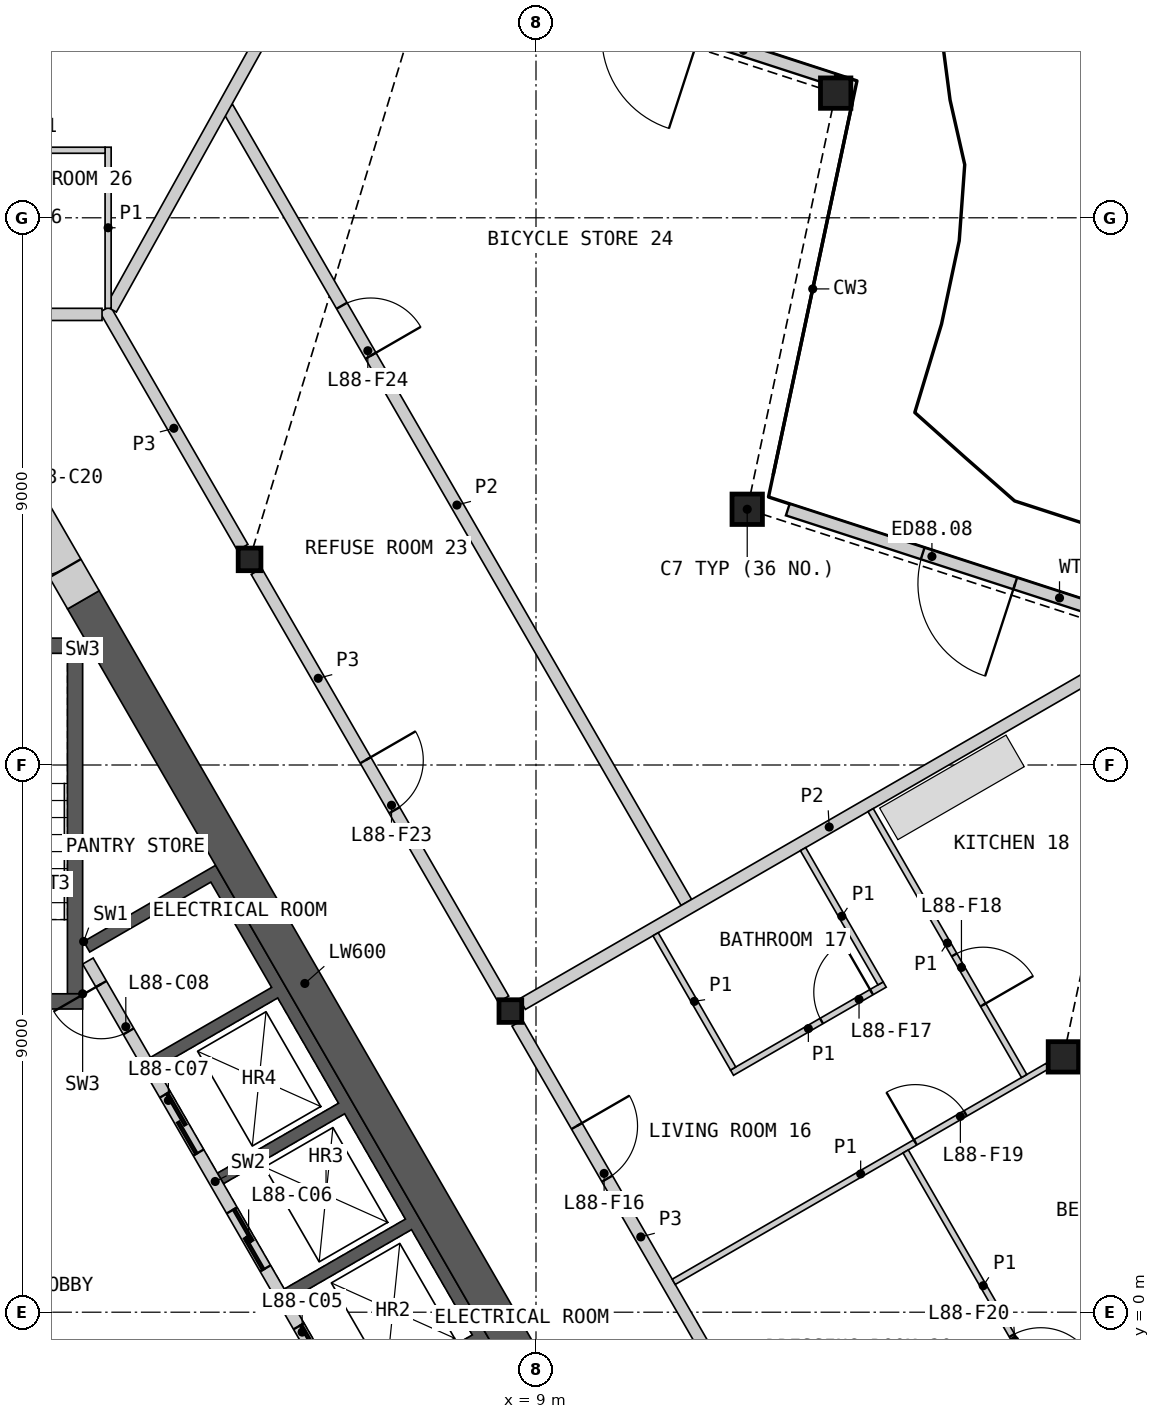
"""IFC4 building model, lengths in metres.
Left out: names, types, materials, properties, quantities, classifications, styles, units other than length and angle.
Written with IfcOpenShell. Run it as: python <this file> out.ifc"""

import sys

from ifc_helpers import new_model, si_unit, direction, frame, frame_2d, origin, origin_2d, place, context, subcontext, project, spatial, polyline, rectangle, hollow_rectangle, i_section, outline, extrude, element, fill, save


model = new_model("IFC4")
c1 = context("Model", 3, precision=1e-05, world=origin(), true_north=direction((0.0, 1.0)))
c2 = subcontext(c1, "Body", "Model", "MODEL_VIEW")
j1 = project(units=[si_unit("LENGTHUNIT", "METRE"), si_unit("PLANEANGLEUNIT", "RADIAN")], contexts=[c1])
p1 = place(None, origin())
s1 = spatial("IfcSite", under=j1, at=p1, CompositionType="ELEMENT")
p2 = place(p1, origin())
s2 = spatial("IfcBuilding", under=s1, at=p2, CompositionType="ELEMENT")
p3 = place(p2, frame((0.0, 0.0, 388.2)))
s3 = spatial("IfcBuildingStorey", under=s2, at=p3, CompositionType="ELEMENT", Elevation=388.2)
for number, where, z_axis, x_axis in (
    (1, (17.674, 4.199, 0.0), (0.0, 0.0, 1.0), (1.0, 0.0, 0.0)),
    (2, (12.474, 13.206, 0.0), (0.0, 0.0, 1.0), (1.0, 0.0, 0.0)),
    (3, (13.929, 20.051, 0.0), (0.0, 0.0, 1.0), (1.0, 0.0, 0.0)),
):
    element("IfcColumn", number, at=place(p3, frame(where, z_axis=z_axis, x_axis=x_axis)), inside=s3, PredefinedType="COLUMN", context=c2, shape_type="SweptSolid", body=[
        extrude(hollow_rectangle(XDim=0.5, YDim=0.5, WallThickness=0.03, at=origin_2d()), origin(), (0.0, 0.0, 1.0), 3.4),
    ])
for number, where, z_axis, x_axis in (
    (4, (8.578, 4.953, 0.0), (0.0, 0.0, 1.0), (1.0, 0.0, 0.0)),
    (5, (4.289, 12.382, 0.0), (0.0, 0.0, 1.0), (1.0, 0.0, 0.0)),
):
    element("IfcColumn", number, at=place(p3, frame(where, z_axis=z_axis, x_axis=x_axis)), inside=s3, PredefinedType="COLUMN", context=c2, shape_type="SweptSolid", body=[
        extrude(i_section(OverallWidth=0.374, OverallDepth=0.372, WebThickness=0.016, FlangeThickness=0.026, at=origin_2d()), origin(), (0.0, 0.0, 1.0), 3.4),
    ])
p4 = place(p3, frame((19.099, 11.264, 0.0), z_axis=(0.0, 0.0, 1.0), x_axis=(-0.951056402988, 0.3090173431, 0.0)))
e6 = element("IfcWall", 6, at=p4, inside=s3, PredefinedType="SOLIDWALL", context=c2, shape_type="SweptSolid", body=[
    extrude(rectangle(XDim=6.265, YDim=0.2, at=frame_2d((3.133, 0.0))), origin(), (0.0, 0.0, 1.0), 2.634),
])
p5 = place(p4, frame((2.333, 0.0, 0.0)))
e7 = element("IfcOpeningElement", 7, at=p5, cuts=e6, PredefinedType="OPENING", context=c2, shape_type="SweptSolid", body=[
    extrude(rectangle(XDim=1.6, YDim=2.25, at=frame_2d((0.8, 1.125))), frame((0.0, 0.11, 0.0), z_axis=(0.0, -1.0, 0.0), x_axis=(1.0, 0.0, 0.0)), (0.0, 0.0, 1.0), 0.22),
])
p6 = place(p3, frame((13.899, 20.271, 0.0), z_axis=(0.0, 0.0, 1.0), x_axis=(-0.951056402988, 0.3090173431, 0.0)))
e8 = element("IfcWall", 8, at=p6, inside=s3, PredefinedType="SOLIDWALL", context=c2, shape_type="SweptSolid", body=[
    extrude(rectangle(XDim=6.265, YDim=0.2, at=frame_2d((3.133, 0.0))), origin(), (0.0, 0.0, 1.0), 2.634),
])
p7 = place(p6, frame((2.333, 0.0, 0.0)))
e9 = element("IfcOpeningElement", 9, at=p7, cuts=e8, PredefinedType="OPENING", context=c2, shape_type="SweptSolid", body=[
    extrude(rectangle(XDim=1.6, YDim=2.25, at=frame_2d((0.8, 1.125))), frame((0.0, 0.11, 0.0), z_axis=(0.0, -1.0, 0.0), x_axis=(1.0, 0.0, 0.0)), (0.0, 0.0, 1.0), 0.22),
])
p8 = place(p3, origin())
e10 = element("IfcWall", 10, at=p8, inside=s3, PredefinedType="SHEAR", context=c2, shape_type="SweptSolid", body=[
    extrude(outline(polyline([(1.561, 6.097), (3.731, 7.35), (8.231, -0.444), (6.061, -1.697), (5.96, -1.524), (7.952, -0.374), (6.952, 1.358), (4.96, 0.208), (4.861, 0.381), (6.852, 1.531), (5.852, 3.263), (3.861, 2.113), (3.76, 2.287), (5.752, 3.437), (4.752, 5.169), (2.76, 4.019), (2.66, 4.192), (4.652, 5.342), (3.652, 7.074), (1.66, 5.924), (1.561, 6.097)])), origin(), (0.0, 0.0, 1.0), 3.1),
])
p9 = place(p3, frame((5.817, -1.476, 0.0), z_axis=(0.0, 0.0, 1.0), x_axis=(-0.500002616675, 0.866023893041, 0.0)))
e11 = element("IfcWall", 11, at=p9, inside=s3, PredefinedType="SOLIDWALL", context=c2, shape_type="SweptSolid", body=[
    extrude(rectangle(XDim=8.373, YDim=0.2, at=frame_2d((4.187, 0.0))), origin(), (0.0, 0.0, 1.0), 3.1),
])
p10 = place(p9, frame((0.337, 0.0, 0.0)))
e12 = element("IfcOpeningElement", 12, at=p10, cuts=e11, PredefinedType="OPENING", context=c2, shape_type="SweptSolid", body=[
    extrude(rectangle(XDim=1.1, YDim=2.1, at=frame_2d((0.55, 1.05))), frame((0.0, 0.11, 0.0), z_axis=(0.0, -1.0, 0.0), x_axis=(1.0, 0.0, 0.0)), (0.0, 0.0, 1.0), 0.22),
])
p11 = place(p9, frame((2.537, 0.0, 0.0)))
e13 = element("IfcOpeningElement", 13, at=p11, cuts=e11, PredefinedType="OPENING", context=c2, shape_type="SweptSolid", body=[
    extrude(rectangle(XDim=1.1, YDim=2.1, at=frame_2d((0.55, 1.05))), frame((0.0, 0.11, 0.0), z_axis=(0.0, -1.0, 0.0), x_axis=(1.0, 0.0, 0.0)), (0.0, 0.0, 1.0), 0.22),
])
p12 = place(p9, frame((4.737, 0.0, 0.0)))
e14 = element("IfcOpeningElement", 14, at=p12, cuts=e11, PredefinedType="OPENING", context=c2, shape_type="SweptSolid", body=[
    extrude(rectangle(XDim=1.1, YDim=2.1, at=frame_2d((0.55, 1.05))), frame((0.0, 0.11, 0.0), z_axis=(0.0, -1.0, 0.0), x_axis=(1.0, 0.0, 0.0)), (0.0, 0.0, 1.0), 0.22),
])
p13 = place(p9, frame((7.037, 0.0, 0.0)))
e15 = element("IfcOpeningElement", 15, at=p13, cuts=e11, PredefinedType="OPENING", context=c2, shape_type="SweptSolid", body=[
    extrude(rectangle(XDim=0.9, YDim=2.1, at=frame_2d((0.45, 1.05))), frame((0.0, 0.11, 0.0), z_axis=(0.0, -1.0, 0.0), x_axis=(1.0, 0.0, 0.0)), (0.0, 0.0, 1.0), 0.22),
])
p14 = place(p3, origin())
e16 = element("IfcWall", 16, at=p14, inside=s3, PredefinedType="SHEAR", context=c2, shape_type="SweptSolid", body=[
    extrude(outline(polyline([(1.544, 5.237), (1.544, 11.087), (1.294, 10.837), (1.294, 5.237), (1.544, 5.237)])), origin(), (0.0, 0.0, 1.0), 3.1),
])
p15 = place(p3, origin())
e17 = element("IfcWall", 17, at=p15, inside=s3, PredefinedType="SHEAR", context=c2, shape_type="SweptSolid", body=[
    extrude(outline(polyline([(1.544, 11.087), (-1.544, 11.087), (-1.294, 10.837), (1.294, 10.837), (1.544, 11.087)])), origin(), (0.0, 0.0, 1.0), 3.1),
])
p16 = place(p3, frame((1.544, 5.112, 0.0), z_axis=(0.0, 0.0, 1.0), x_axis=(-1.0, 0.0, 0.0)))
e18 = element("IfcWall", 18, at=p16, inside=s3, PredefinedType="SHEAR", context=c2, shape_type="SweptSolid", body=[
    extrude(rectangle(XDim=3.088, YDim=0.25, at=frame_2d((1.544, 0.0))), origin(), (0.0, 0.0, 1.0), 3.1),
])
p17 = place(p16, frame((0.994, 0.0, 0.0)))
e19 = element("IfcOpeningElement", 19, at=p17, cuts=e18, PredefinedType="OPENING", context=c2, shape_type="SweptSolid", body=[
    extrude(rectangle(XDim=1.1, YDim=2.1, at=frame_2d((0.55, 1.05))), frame((0.0, 0.135, 0.0), z_axis=(0.0, -1.0, 0.0), x_axis=(1.0, 0.0, 0.0)), (0.0, 0.0, 1.0), 0.27),
])
p18 = place(p3, frame((8.841, -0.902, 0.0), z_axis=(0.0, 0.0, 1.0), x_axis=(-0.499995618375, 0.866027933502, 0.0)))
e20 = element("IfcWall", 20, at=p18, inside=s3, PredefinedType="SHEAR", context=c2, shape_type="SweptSolid", body=[
    extrude(rectangle(XDim=14.571, YDim=0.6, at=frame_2d((7.285, 0.0))), origin(), (0.0, 0.0, 1.0), 3.1),
])
p19 = place(p3, frame((1.556, 11.716, 0.0), z_axis=(0.0, 0.0, 1.0), x_axis=(-0.500018667571, 0.866014625789, 0.0)))
e21 = element("IfcWall", 21, at=p19, inside=s3, PredefinedType="SHEAR", context=c2, shape_type="SweptSolid", body=[
    extrude(rectangle(XDim=2.592, YDim=0.6, at=frame_2d((1.296, 0.0))), origin(), (0.0, 0.0, 1.0), 3.1),
])
p20 = place(p19, frame((0.6, 0.0, 0.0)))
e22 = element("IfcOpeningElement", 22, at=p20, cuts=e21, PredefinedType="OPENING", context=c2, shape_type="SweptSolid", body=[
    extrude(rectangle(XDim=1.0, YDim=2.1, at=frame_2d((0.5, 1.05))), frame((0.0, 0.31, 0.0), z_axis=(0.0, -1.0, 0.0), x_axis=(1.0, 0.0, 0.0)), (0.0, 0.0, 1.0), 0.62),
])
p21 = place(p3, frame((4.403, 12.185, 0.0), z_axis=(0.0, 0.0, 1.0), x_axis=(0.499992155518, -0.866029932751, 0.0)))
e23 = element("IfcWall", 23, at=p21, inside=s3, PredefinedType="PARTITIONING", context=c2, shape_type="SweptSolid", body=[
    extrude(rectangle(XDim=8.123, YDim=0.2, at=frame_2d((4.062, 0.0))), origin(), (0.0, 0.0, 1.0), 3.1),
])
p22 = place(p21, frame((3.587, 0.0, 0.0)))
e24 = element("IfcOpeningElement", 24, at=p22, cuts=e23, PredefinedType="OPENING", context=c2, shape_type="SweptSolid", body=[
    extrude(rectangle(XDim=0.95, YDim=2.1, at=frame_2d((0.475, 1.05))), frame((0.0, 0.11, 0.0), z_axis=(0.0, -1.0, 0.0), x_axis=(1.0, 0.0, 0.0)), (0.0, 0.0, 1.0), 0.22),
])
p23 = place(p3, frame((8.692, 4.756, 0.0), z_axis=(0.0, 0.0, 1.0), x_axis=(0.500001682468, -0.866024432409, 0.0)))
e25 = element("IfcWall", 25, at=p23, inside=s3, PredefinedType="PARTITIONING", context=c2, shape_type="SweptSolid", body=[
    extrude(rectangle(XDim=8.124, YDim=0.2, at=frame_2d((4.062, 0.0))), origin(), (0.0, 0.0, 1.0), 3.1),
])
p24 = place(p23, frame((1.956, 0.0, 0.0)))
e26 = element("IfcOpeningElement", 26, at=p24, cuts=e25, PredefinedType="OPENING", context=c2, shape_type="SweptSolid", body=[
    extrude(rectangle(XDim=1.0, YDim=2.1, at=frame_2d((0.5, 1.05))), frame((0.0, 0.11, 0.0), z_axis=(0.0, -1.0, 0.0), x_axis=(1.0, 0.0, 0.0)), (0.0, 0.0, 1.0), 0.22),
])
p25 = place(p3, frame((1.913, 16.498, 0.0), z_axis=(0.0, 0.0, 1.0), x_axis=(0.499974648164, -0.866040040179, 0.0)))
e27 = element("IfcWall", 27, at=p25, inside=s3, PredefinedType="PARTITIONING", context=c2, shape_type="SweptSolid", body=[
    extrude(rectangle(XDim=4.525, YDim=0.2, at=frame_2d((2.263, 0.0))), origin(), (0.0, 0.0, 1.0), 3.1),
])
p26 = place(p3, frame((-1.838, 16.411, 0.0), z_axis=(0.0, 0.0, 1.0), x_axis=(1.0, 0.0, 0.0)))
e28 = element("IfcWall", 28, at=p26, inside=s3, PredefinedType="PARTITIONING", context=c2, shape_type="SweptSolid", body=[
    extrude(rectangle(XDim=3.701, YDim=0.2, at=frame_2d((1.851, 0.0))), origin(), (0.0, 0.0, 1.0), 3.1),
])
p27 = place(p26, frame((0.25, 0.0, 0.0)))
e29 = element("IfcOpeningElement", 29, at=p27, cuts=e28, PredefinedType="OPENING", context=c2, shape_type="SweptSolid", body=[
    extrude(rectangle(XDim=1.0, YDim=2.1, at=frame_2d((0.5, 1.05))), frame((0.0, 0.11, 0.0), z_axis=(0.0, -1.0, 0.0), x_axis=(1.0, 0.0, 0.0)), (0.0, 0.0, 1.0), 0.22),
])
p28 = place(p3, frame((3.926, 19.811, 0.0), z_axis=(0.0, 0.0, 1.0), x_axis=(0.500001082559, -0.866024778768, 0.0)))
e30 = element("IfcWall", 30, at=p28, inside=s3, PredefinedType="PARTITIONING", context=c2, shape_type="SweptSolid", body=[
    extrude(rectangle(XDim=15.094, YDim=0.2, at=frame_2d((7.547, 0.0))), origin(), (0.0, 0.0, 1.0), 2.33),
])
p29 = place(p28, frame((3.761, 0.0, 0.0)))
e31 = element("IfcOpeningElement", 31, at=p29, cuts=e30, PredefinedType="OPENING", context=c2, shape_type="SweptSolid", body=[
    extrude(rectangle(XDim=0.95, YDim=2.1, at=frame_2d((0.475, 1.05))), frame((0.0, 0.11, 0.0), z_axis=(0.0, -1.0, 0.0), x_axis=(1.0, 0.0, 0.0)), (0.0, 0.0, 1.0), 0.22),
])
p30 = place(p3, frame((2.012, 16.498, 0.0), z_axis=(0.0, 0.0, 1.0), x_axis=(0.485991996179, 0.873963259897, 0.0)))
e32 = element("IfcWall", 32, at=p30, inside=s3, PredefinedType="PARTITIONING", context=c2, shape_type="SweptSolid", body=[
    extrude(rectangle(XDim=14.073, YDim=0.2, at=frame_2d((7.036, 0.0))), origin(), (0.0, 0.0, 1.0), 2.33),
])
p31 = place(p3, frame((8.775, 5.066, 0.0), z_axis=(0.0, 0.0, 1.0), x_axis=(0.866023724155, 0.500002909193, 0.0)))
e33 = element("IfcWall", 33, at=p31, inside=s3, PredefinedType="PARTITIONING", context=c2, shape_type="SweptSolid", body=[
    extrude(rectangle(XDim=11.655, YDim=0.2, at=frame_2d((5.827, 0.0))), origin(), (0.0, 0.0, 1.0), 2.33),
])
p32 = place(p3, frame((13.865, -4.004, 0.0), z_axis=(0.0, 0.0, 1.0), x_axis=(0.866023404247, 0.500003463284, 0.0)))
e34 = element("IfcWall", 34, at=p32, inside=s3, PredefinedType="PARTITIONING", context=c2, shape_type="SweptSolid", body=[
    extrude(rectangle(XDim=11.782, YDim=0.1, at=frame_2d((5.891, 0.0))), origin(), (0.0, 0.0, 1.0), 2.33),
])
p33 = place(p32, frame((6.269, 0.0, 0.0)))
e35 = element("IfcOpeningElement", 35, at=p33, cuts=e34, PredefinedType="OPENING", context=c2, shape_type="SweptSolid", body=[
    extrude(rectangle(XDim=0.95, YDim=2.1, at=frame_2d((0.475, 1.05))), frame((0.0, 0.06, 0.0), z_axis=(0.0, -1.0, 0.0), x_axis=(1.0, 0.0, 0.0)), (0.0, 0.0, 1.0), 0.12),
])
p34 = place(p3, frame((11.265, 0.5, 0.0), z_axis=(0.0, 0.0, 1.0), x_axis=(0.866033839264, 0.499985389037, 0.0)))
e36 = element("IfcWall", 36, at=p34, inside=s3, PredefinedType="PARTITIONING", context=c2, shape_type="SweptSolid", body=[
    extrude(rectangle(XDim=7.1, YDim=0.1, at=frame_2d((3.55, 0.0))), origin(), (0.0, 0.0, 1.0), 2.33),
])
p35 = place(p34, frame((4.588, 0.0, 0.0)))
e37 = element("IfcOpeningElement", 37, at=p35, cuts=e36, PredefinedType="OPENING", context=c2, shape_type="SweptSolid", body=[
    extrude(rectangle(XDim=0.95, YDim=2.1, at=frame_2d((0.475, 1.05))), frame((0.0, 0.06, 0.0), z_axis=(0.0, -1.0, 0.0), x_axis=(1.0, 0.0, 0.0)), (0.0, 0.0, 1.0), 0.12),
])
p36 = place(p3, frame((15.08, 2.644, 0.0), z_axis=(0.0, 0.0, 1.0), x_axis=(0.500005610874, -0.86602216432, 0.0)))
e38 = element("IfcWall", 38, at=p36, inside=s3, PredefinedType="PARTITIONING", context=c2, shape_type="SweptSolid", body=[
    extrude(rectangle(XDim=5.1, YDim=0.1, at=frame_2d((2.55, 0.0))), origin(), (0.0, 0.0, 1.0), 2.33),
])
p37 = place(p36, frame((3.494, 0.0, 0.0)))
e39 = element("IfcOpeningElement", 39, at=p37, cuts=e38, PredefinedType="OPENING", context=c2, shape_type="SweptSolid", body=[
    extrude(rectangle(XDim=0.95, YDim=2.1, at=frame_2d((0.475, 1.05))), frame((0.0, 0.06, 0.0), z_axis=(0.0, -1.0, 0.0), x_axis=(1.0, 0.0, 0.0)), (0.0, 0.0, 1.0), 0.12),
])
p38 = place(p3, frame((14.503, 8.258, 0.0), z_axis=(0.0, 0.0, 1.0), x_axis=(0.500012591307, -0.866018134068, 0.0)))
e40 = element("IfcWall", 40, at=p38, inside=s3, PredefinedType="PARTITIONING", context=c2, shape_type="SweptSolid", body=[
    extrude(rectangle(XDim=5.05, YDim=0.1, at=frame_2d((2.525, 0.0))), origin(), (0.0, 0.0, 1.0), 2.33),
])
p39 = place(p38, frame((2.75, 0.0, 0.0)))
e41 = element("IfcOpeningElement", 41, at=p39, cuts=e40, PredefinedType="OPENING", context=c2, shape_type="SweptSolid", body=[
    extrude(rectangle(XDim=0.95, YDim=2.1, at=frame_2d((0.475, 1.05))), frame((0.0, 0.06, 0.0), z_axis=(0.0, -1.0, 0.0), x_axis=(1.0, 0.0, 0.0)), (0.0, 0.0, 1.0), 0.12),
])
p40 = place(p3, frame((12.223, 3.939, 0.0), z_axis=(0.0, 0.0, 1.0), x_axis=(0.866032775405, 0.499987231761, 0.0)))
e42 = element("IfcWall", 42, at=p40, inside=s3, PredefinedType="PARTITIONING", context=c2, shape_type="SweptSolid", body=[
    extrude(rectangle(XDim=2.9, YDim=0.1, at=frame_2d((1.45, 0.0))), origin(), (0.0, 0.0, 1.0), 2.33),
])
p41 = place(p40, frame((1.7, 0.0, 0.0)))
e43 = element("IfcOpeningElement", 43, at=p41, cuts=e42, PredefinedType="OPENING", context=c2, shape_type="SweptSolid", body=[
    extrude(rectangle(XDim=0.95, YDim=2.1, at=frame_2d((0.475, 1.05))), frame((0.0, 0.06, 0.0), z_axis=(0.0, -1.0, 0.0), x_axis=(1.0, 0.0, 0.0)), (0.0, 0.0, 1.0), 0.12),
])
for number, where, z_axis, x_axis in (
    (44, (10.967, 6.216, 0.0), (0.0, 0.0, 1.0), (0.5, -0.866, 0.0)),
    (45, (13.392, 7.616, 0.0), (0.0, 0.0, 1.0), (0.5, -0.866, 0.0)),
):
    element("IfcWall", number, at=place(p3, frame(where, z_axis=z_axis, x_axis=x_axis)), inside=s3, PredefinedType="PARTITIONING", context=c2, shape_type="SweptSolid", body=[
        extrude(rectangle(XDim=2.55, YDim=0.1, at=frame_2d((1.275, 0.0))), origin(), (0.0, 0.0, 1.0), 2.33),
    ])
p42 = place(p3, frame((1.963, 16.511, 0.0), z_axis=(0.0, 0.0, 1.0), x_axis=(0.0, 1.0, 0.0)))
e46 = element("IfcWall", 46, at=p42, inside=s3, PredefinedType="PARTITIONING", context=c2, shape_type="SweptSolid", body=[
    extrude(rectangle(XDim=2.65, YDim=0.1, at=frame_2d((1.325, 0.0))), origin(), (0.0, 0.0, 1.0), 2.33),
])
p43 = place(p3, frame((-0.06, 19.111, 0.0), z_axis=(0.0, 0.0, 1.0), x_axis=(1.0, 0.0, 0.0)))
e47 = element("IfcWall", 47, at=p43, inside=s3, PredefinedType="PARTITIONING", context=c2, shape_type="SweptSolid", body=[
    extrude(rectangle(XDim=1.973, YDim=0.1, at=frame_2d((0.987, 0.0))), origin(), (0.0, 0.0, 1.0), 2.33),
])
p44 = place(p5, origin())
e48 = element("IfcDoor", 48, at=p44, inside=s3, OperationType="DOUBLE_DOOR_SINGLE_SWING", PredefinedType="DOOR", context=c2, shape_type="SweptSolid", body=[
    extrude(rectangle(XDim=1.6, YDim=2.25, at=frame_2d((0.8, 1.125))), frame((0.0, 0.025, 0.0), z_axis=(0.0, -1.0, 0.0), x_axis=(1.0, 0.0, 0.0)), (0.0, 0.0, 1.0), 0.05),
])
fill(e7, e48)
p45 = place(p10, origin())
e49 = element("IfcDoor", 49, at=p45, inside=s3, OperationType="SLIDING_TO_LEFT", PredefinedType="DOOR", context=c2, shape_type="SweptSolid", body=[
    extrude(rectangle(XDim=1.1, YDim=2.1, at=frame_2d((0.55, 1.05))), frame((0.0, 0.025, 0.0), z_axis=(0.0, -1.0, 0.0), x_axis=(1.0, 0.0, 0.0)), (0.0, 0.0, 1.0), 0.05),
])
fill(e12, e49)
p46 = place(p11, origin())
e50 = element("IfcDoor", 50, at=p46, inside=s3, OperationType="SLIDING_TO_LEFT", PredefinedType="DOOR", context=c2, shape_type="SweptSolid", body=[
    extrude(rectangle(XDim=1.1, YDim=2.1, at=frame_2d((0.55, 1.05))), frame((0.0, 0.025, 0.0), z_axis=(0.0, -1.0, 0.0), x_axis=(1.0, 0.0, 0.0)), (0.0, 0.0, 1.0), 0.05),
])
fill(e13, e50)
p47 = place(p12, origin())
e51 = element("IfcDoor", 51, at=p47, inside=s3, OperationType="SLIDING_TO_LEFT", PredefinedType="DOOR", context=c2, shape_type="SweptSolid", body=[
    extrude(rectangle(XDim=1.1, YDim=2.1, at=frame_2d((0.55, 1.05))), frame((0.0, 0.025, 0.0), z_axis=(0.0, -1.0, 0.0), x_axis=(1.0, 0.0, 0.0)), (0.0, 0.0, 1.0), 0.05),
])
fill(e14, e51)
p48 = place(p13, origin())
e52 = element("IfcDoor", 52, at=p48, inside=s3, OperationType="SINGLE_SWING_RIGHT", PredefinedType="DOOR", context=c2, shape_type="SweptSolid", body=[
    extrude(rectangle(XDim=0.9, YDim=2.1, at=frame_2d((0.45, 1.05))), frame((0.0, 0.025, 0.0), z_axis=(0.0, -1.0, 0.0), x_axis=(1.0, 0.0, 0.0)), (0.0, 0.0, 1.0), 0.05),
])
fill(e15, e52)
p49 = place(p20, origin())
e53 = element("IfcDoor", 53, at=p49, inside=s3, OperationType="SINGLE_SWING_RIGHT", PredefinedType="DOOR", context=c2, shape_type="SweptSolid", body=[
    extrude(rectangle(XDim=1.0, YDim=2.1, at=frame_2d((0.5, 1.05))), frame((0.0, 0.055, 0.0), z_axis=(0.0, -1.0, 0.0), x_axis=(1.0, 0.0, 0.0)), (0.0, 0.0, 1.0), 0.05),
])
fill(e22, e53)
p50 = place(p24, origin())
e54 = element("IfcDoor", 54, at=p50, inside=s3, OperationType="SINGLE_SWING_LEFT", PredefinedType="DOOR", context=c2, shape_type="SweptSolid", body=[
    extrude(rectangle(XDim=1.0, YDim=2.1, at=frame_2d((0.5, 1.05))), frame((0.0, 0.025, 0.0), z_axis=(0.0, -1.0, 0.0), x_axis=(1.0, 0.0, 0.0)), (0.0, 0.0, 1.0), 0.05),
])
fill(e26, e54)
p51 = place(p41, origin())
e55 = element("IfcDoor", 55, at=p51, inside=s3, OperationType="SINGLE_SWING_RIGHT", PredefinedType="DOOR", context=c2, shape_type="SweptSolid", body=[
    extrude(rectangle(XDim=0.95, YDim=2.1, at=frame_2d((0.475, 1.05))), frame((0.0, 0.025, 0.0), z_axis=(0.0, -1.0, 0.0), x_axis=(1.0, 0.0, 0.0)), (0.0, 0.0, 1.0), 0.05),
])
fill(e43, e55)
p52 = place(p39, origin())
e56 = element("IfcDoor", 56, at=p52, inside=s3, OperationType="SINGLE_SWING_RIGHT", PredefinedType="DOOR", context=c2, shape_type="SweptSolid", body=[
    extrude(rectangle(XDim=0.95, YDim=2.1, at=frame_2d((0.475, 1.05))), frame((0.0, 0.025, 0.0), z_axis=(0.0, -1.0, 0.0), x_axis=(1.0, 0.0, 0.0)), (0.0, 0.0, 1.0), 0.05),
])
fill(e41, e56)
p53 = place(p35, origin())
e57 = element("IfcDoor", 57, at=p53, inside=s3, OperationType="SINGLE_SWING_LEFT", PredefinedType="DOOR", context=c2, shape_type="SweptSolid", body=[
    extrude(rectangle(XDim=0.95, YDim=2.1, at=frame_2d((0.475, 1.05))), frame((0.0, 0.025, 0.0), z_axis=(0.0, -1.0, 0.0), x_axis=(1.0, 0.0, 0.0)), (0.0, 0.0, 1.0), 0.05),
])
fill(e37, e57)
p54 = place(p37, origin())
e58 = element("IfcDoor", 58, at=p54, inside=s3, OperationType="SINGLE_SWING_RIGHT", PredefinedType="DOOR", context=c2, shape_type="SweptSolid", body=[
    extrude(rectangle(XDim=0.95, YDim=2.1, at=frame_2d((0.475, 1.05))), frame((0.0, 0.025, 0.0), z_axis=(0.0, -1.0, 0.0), x_axis=(1.0, 0.0, 0.0)), (0.0, 0.0, 1.0), 0.05),
])
fill(e39, e58)
p55 = place(p22, origin())
e59 = element("IfcDoor", 59, at=p55, inside=s3, OperationType="SINGLE_SWING_LEFT", PredefinedType="DOOR", context=c2, shape_type="SweptSolid", body=[
    extrude(rectangle(XDim=0.95, YDim=2.1, at=frame_2d((0.475, 1.05))), frame((0.0, 0.025, 0.0), z_axis=(0.0, -1.0, 0.0), x_axis=(1.0, 0.0, 0.0)), (0.0, 0.0, 1.0), 0.05),
])
fill(e24, e59)
p56 = place(p29, origin())
e60 = element("IfcDoor", 60, at=p56, inside=s3, OperationType="SINGLE_SWING_RIGHT", PredefinedType="DOOR", context=c2, shape_type="SweptSolid", body=[
    extrude(rectangle(XDim=0.95, YDim=2.1, at=frame_2d((0.475, 1.05))), frame((0.0, 0.025, 0.0), z_axis=(0.0, -1.0, 0.0), x_axis=(1.0, 0.0, 0.0)), (0.0, 0.0, 1.0), 0.05),
])
fill(e31, e60)
save(model, sys.argv[1])
